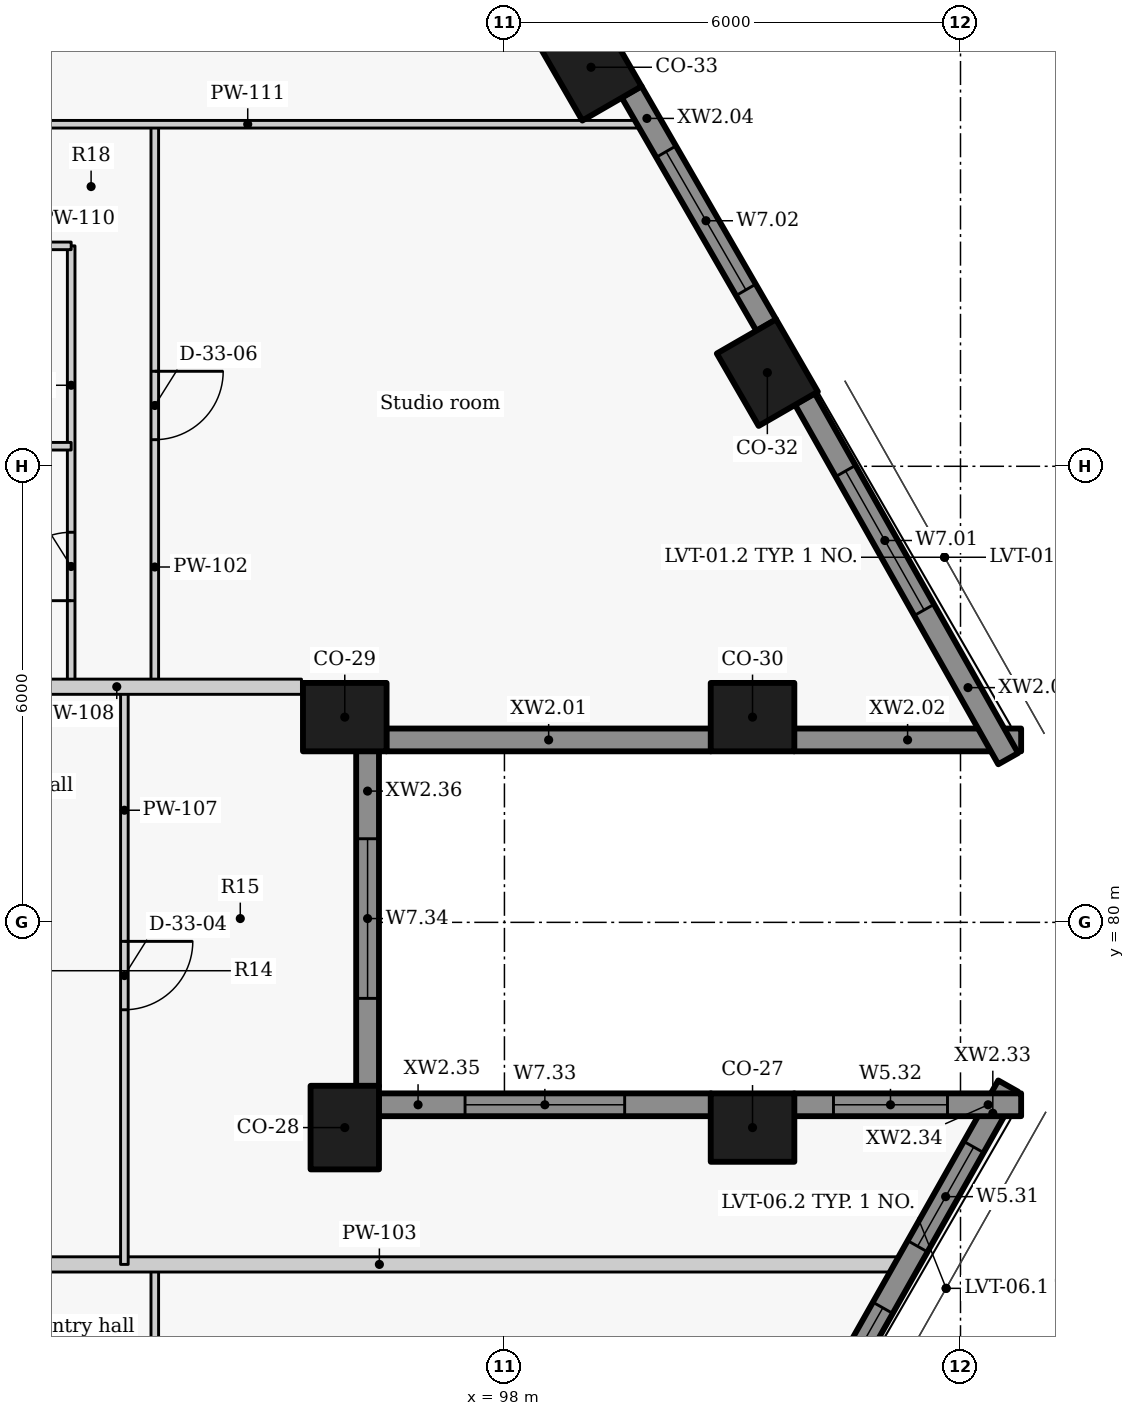
"""IFC4 building model, lengths in metres.
Left out: names, types, materials, properties, quantities, classifications, styles, units other than length and angle.
Written with IfcOpenShell. Run it as: python <this file> out.ifc"""

import sys

from ifc_helpers import new_model, si_unit, direction, frame, frame_2d, origin, origin_2d, place, context, subcontext, project, spatial, rectangle, extrude, element, fill, save


model = new_model("IFC4")
c1 = context("Model", 3, precision=1e-05, world=origin(), true_north=direction((0.0, 1.0)))
c2 = subcontext(c1, "Body", "Model", "MODEL_VIEW")
j1 = project(units=[si_unit("LENGTHUNIT", "METRE"), si_unit("PLANEANGLEUNIT", "RADIAN")], contexts=[c1])
p1 = place(None, origin())
s1 = spatial("IfcSite", under=j1, at=p1, CompositionType="ELEMENT")
p2 = place(p1, origin())
s2 = spatial("IfcBuilding", under=s1, at=p2, CompositionType="ELEMENT")
p3 = place(p2, frame((0.0, 0.0, 259.2)))
s3 = spatial("IfcBuildingStorey", under=s2, at=p3, CompositionType="ELEMENT", Elevation=259.2)
for number, where, z_axis, x_axis in (
    (1, (101.264, 77.3, 0.0), (0.0, 0.0, 1.0), (-1.0, 0.0, 0.0)),
    (2, (95.899, 77.3, 0.0), (0.0, 0.0, 1.0), (0.0, 1.0, 0.0)),
    (3, (95.899, 82.7, 0.0), (0.0, 0.0, 1.0), (1.0, 0.0, 0.0)),
    (4, (101.264, 82.7, 0.0), (0.0, 0.0, 1.0), (1.0, 0.0, 0.0)),
    (5, (101.459, 87.232, 0.0), (0.0, 0.0, 1.0), (-0.5, 0.866, 0.0)),
    (6, (99.139, 91.25, 0.0), (0.0, 0.0, 1.0), (-0.5, 0.866, 0.0)),
):
    element("IfcColumn", number, at=place(p3, frame(where, z_axis=z_axis, x_axis=x_axis)), inside=s3, PredefinedType="COLUMN", context=c2, shape_type="SweptSolid", body=[
        extrude(rectangle(XDim=1.1, YDim=0.9, at=origin_2d()), origin(), (0.0, 0.0, 1.0), 3.3),
    ])
p4 = place(p3, frame((96.446, 82.4, 0.0), z_axis=(0.0, 0.0, 1.0), x_axis=(1.0, 0.0, 0.0)))
e7 = element("IfcWall", 7, at=p4, inside=s3, PredefinedType="SOLIDWALL", context=c2, shape_type="SweptSolid", body=[
    extrude(rectangle(XDim=4.272, YDim=0.3, at=frame_2d((2.136, 0.0))), origin(), (0.0, 0.0, 1.0), 2.425),
])
p5 = place(p3, frame((101.81, 82.4, 0.0), z_axis=(0.0, 0.0, 1.0), x_axis=(1.0, 0.0, 0.0)))
e8 = element("IfcWall", 8, at=p5, inside=s3, PredefinedType="SOLIDWALL", context=c2, shape_type="SweptSolid", body=[
    extrude(rectangle(XDim=2.988, YDim=0.3, at=frame_2d((1.494, 0.0))), origin(), (0.0, 0.0, 1.0), 2.425),
])
p6 = place(p3, frame((104.627, 82.154, 0.0), z_axis=(0.0, 0.0, 1.0), x_axis=(-0.492080931903, 0.870549456641, 0.0)))
e9 = element("IfcWall", 9, at=p6, inside=s3, PredefinedType="SOLIDWALL", context=c2, shape_type="SweptSolid", body=[
    extrude(rectangle(XDim=5.437, YDim=0.3, at=frame_2d((2.718, 0.0))), origin(), (0.0, 0.0, 1.0), 2.425),
])
p7 = place(p6, frame((2.247, 0.0, 0.9)))
e10 = element("IfcOpeningElement", 10, at=p7, cuts=e9, PredefinedType="OPENING", context=c2, shape_type="SweptSolid", body=[
    extrude(rectangle(XDim=2.1, YDim=1.1, at=frame_2d((1.05, 0.55))), frame((0.0, 0.16, 0.0), z_axis=(0.0, -1.0, 0.0), x_axis=(1.0, 0.0, 0.0)), (0.0, 0.0, 1.0), 0.32),
])
p8 = place(p3, frame((101.446, 87.855, 0.0), z_axis=(0.0, 0.0, 1.0), x_axis=(-0.500010404316, 0.866019396766, 0.0)))
e11 = element("IfcWall", 11, at=p8, inside=s3, PredefinedType="SOLIDWALL", context=c2, shape_type="SweptSolid", body=[
    extrude(rectangle(XDim=3.547, YDim=0.3, at=frame_2d((1.774, 0.0))), origin(), (0.0, 0.0, 1.0), 2.425),
])
p9 = place(p8, frame((0.538, 0.0, 0.9)))
e12 = element("IfcOpeningElement", 12, at=p9, cuts=e11, PredefinedType="OPENING", context=c2, shape_type="SweptSolid", body=[
    extrude(rectangle(XDim=2.1, YDim=1.1, at=frame_2d((1.05, 0.55))), frame((0.0, 0.16, 0.0), z_axis=(0.0, -1.0, 0.0), x_axis=(1.0, 0.0, 0.0)), (0.0, 0.0, 1.0), 0.32),
])
p10 = place(p3, frame((101.952, 73.114, 0.0), z_axis=(0.0, 0.0, 1.0), x_axis=(0.492080931903, 0.870549456641, 0.0)))
e13 = element("IfcWall", 13, at=p10, inside=s3, PredefinedType="SOLIDWALL", context=c2, shape_type="SweptSolid", body=[
    extrude(rectangle(XDim=5.437, YDim=0.3, at=frame_2d((2.718, 0.0))), origin(), (0.0, 0.0, 1.0), 2.425),
])
p11 = place(p10, frame((0.585, 0.0, 0.9)))
e14 = element("IfcOpeningElement", 14, at=p11, cuts=e13, PredefinedType="OPENING", context=c2, shape_type="SweptSolid", body=[
    extrude(rectangle(XDim=1.5, YDim=1.1, at=frame_2d((0.75, 0.55))), frame((0.0, 0.16, 0.0), z_axis=(0.0, -1.0, 0.0), x_axis=(1.0, 0.0, 0.0)), (0.0, 0.0, 1.0), 0.32),
])
p12 = place(p10, frame((3.015, 0.0, 0.9)))
e15 = element("IfcOpeningElement", 15, at=p12, cuts=e13, PredefinedType="OPENING", context=c2, shape_type="SweptSolid", body=[
    extrude(rectangle(XDim=1.5, YDim=1.1, at=frame_2d((0.75, 0.55))), frame((0.0, 0.16, 0.0), z_axis=(0.0, -1.0, 0.0), x_axis=(1.0, 0.0, 0.0)), (0.0, 0.0, 1.0), 0.32),
])
p13 = place(p3, frame((104.798, 77.6, 0.0), z_axis=(0.0, 0.0, 1.0), x_axis=(-1.0, 0.0, 0.0)))
e16 = element("IfcWall", 16, at=p13, inside=s3, PredefinedType="SOLIDWALL", context=c2, shape_type="SweptSolid", body=[
    extrude(rectangle(XDim=2.988, YDim=0.3, at=frame_2d((1.494, 0.0))), origin(), (0.0, 0.0, 1.0), 2.425),
])
p14 = place(p13, frame((0.969, 0.0, 0.9)))
e17 = element("IfcOpeningElement", 17, at=p14, cuts=e16, PredefinedType="OPENING", context=c2, shape_type="SweptSolid", body=[
    extrude(rectangle(XDim=1.5, YDim=1.1, at=frame_2d((0.75, 0.55))), frame((0.0, 0.16, 0.0), z_axis=(0.0, -1.0, 0.0), x_axis=(1.0, 0.0, 0.0)), (0.0, 0.0, 1.0), 0.32),
])
p15 = place(p3, frame((100.718, 77.6, 0.0), z_axis=(0.0, 0.0, 1.0), x_axis=(-1.0, 0.0, 0.0)))
e18 = element("IfcWall", 18, at=p15, inside=s3, PredefinedType="SOLIDWALL", context=c2, shape_type="SweptSolid", body=[
    extrude(rectangle(XDim=4.373, YDim=0.3, at=frame_2d((2.186, 0.0))), origin(), (0.0, 0.0, 1.0), 2.425),
])
p16 = place(p15, frame((1.136, 0.0, 0.9)))
e19 = element("IfcOpeningElement", 19, at=p16, cuts=e18, PredefinedType="OPENING", context=c2, shape_type="SweptSolid", body=[
    extrude(rectangle(XDim=2.1, YDim=1.1, at=frame_2d((1.05, 0.55))), frame((0.0, 0.16, 0.0), z_axis=(0.0, -1.0, 0.0), x_axis=(1.0, 0.0, 0.0)), (0.0, 0.0, 1.0), 0.32),
])
p17 = place(p3, frame((96.199, 77.846, 0.0), z_axis=(0.0, 0.0, 1.0), x_axis=(0.0, 1.0, 0.0)))
e20 = element("IfcWall", 20, at=p17, inside=s3, PredefinedType="SOLIDWALL", context=c2, shape_type="SweptSolid", body=[
    extrude(rectangle(XDim=4.408, YDim=0.3, at=frame_2d((2.204, 0.0))), origin(), (0.0, 0.0, 1.0), 2.425),
])
p18 = place(p17, frame((1.154, 0.0, 0.9)))
e21 = element("IfcOpeningElement", 21, at=p18, cuts=e20, PredefinedType="OPENING", context=c2, shape_type="SweptSolid", body=[
    extrude(rectangle(XDim=2.1, YDim=1.1, at=frame_2d((1.05, 0.55))), frame((0.0, 0.16, 0.0), z_axis=(0.0, -1.0, 0.0), x_axis=(1.0, 0.0, 0.0)), (0.0, 0.0, 1.0), 0.32),
])
p19 = place(p3, frame((92.3, 83.1, 0.0), z_axis=(0.0, 0.0, 1.0), x_axis=(0.0, 1.0, 0.0)))
e22 = element("IfcWall", 22, at=p19, inside=s3, PredefinedType="PARTITIONING", context=c2, shape_type="SweptSolid", body=[
    extrude(rectangle(XDim=5.8, YDim=0.1, at=frame_2d((2.9, 0.0))), origin(), (0.0, 0.0, 1.0), 3.025),
])
p20 = place(p19, frame((1.132, 0.0, 0.0)))
e23 = element("IfcOpeningElement", 23, at=p20, cuts=e22, PredefinedType="OPENING", context=c2, shape_type="SweptSolid", body=[
    extrude(rectangle(XDim=0.9, YDim=2.1, at=frame_2d((0.45, 1.05))), frame((0.0, 0.06, 0.0), z_axis=(0.0, -1.0, 0.0), x_axis=(1.0, 0.0, 0.0)), (0.0, 0.0, 1.0), 0.12),
])
p21 = place(p3, frame((93.4, 75.5, 0.0), z_axis=(0.0, 0.0, 1.0), x_axis=(0.0, -1.0, 0.0)))
e24 = element("IfcWall", 24, at=p21, inside=s3, PredefinedType="PARTITIONING", context=c2, shape_type="SweptSolid", body=[
    extrude(rectangle(XDim=9.05, YDim=0.1, at=frame_2d((4.525, 0.0))), origin(), (0.0, 0.0, 1.0), 3.025),
])
p22 = place(p21, frame((4.075, 0.0, 0.0)))
e25 = element("IfcOpeningElement", 25, at=p22, cuts=e24, PredefinedType="OPENING", context=c2, shape_type="SweptSolid", body=[
    extrude(rectangle(XDim=0.9, YDim=2.1, at=frame_2d((0.45, 1.05))), frame((0.0, 0.06, 0.0), z_axis=(0.0, -1.0, 0.0), x_axis=(1.0, 0.0, 0.0)), (0.0, 0.0, 1.0), 0.12),
])
p23 = place(p3, frame((93.4, 90.5, 0.0), z_axis=(0.0, 0.0, 1.0), x_axis=(0.0, -1.0, 0.0)))
e26 = element("IfcWall", 26, at=p23, inside=s3, PredefinedType="PARTITIONING", context=c2, shape_type="SweptSolid", body=[
    extrude(rectangle(XDim=7.4, YDim=0.1, at=frame_2d((3.7, 0.0))), origin(), (0.0, 0.0, 1.0), 3.025),
])
p24 = place(p23, frame((3.25, 0.0, 0.0)))
e27 = element("IfcOpeningElement", 27, at=p24, cuts=e26, PredefinedType="OPENING", context=c2, shape_type="SweptSolid", body=[
    extrude(rectangle(XDim=0.9, YDim=2.1, at=frame_2d((0.45, 1.05))), frame((0.0, 0.06, 0.0), z_axis=(0.0, -1.0, 0.0), x_axis=(1.0, 0.0, 0.0)), (0.0, 0.0, 1.0), 0.12),
])
p25 = place(p3, frame((89.5, 75.5, 0.0), z_axis=(0.0, 0.0, 1.0), x_axis=(1.0, 0.0, 0.0)))
e28 = element("IfcWall", 28, at=p25, inside=s3, PredefinedType="PARTITIONING", context=c2, shape_type="SweptSolid", body=[
    extrude(rectangle(XDim=13.709, YDim=0.2, at=frame_2d((6.855, 0.0))), origin(), (0.0, 0.0, 1.0), 2.405),
])
p26 = place(p3, frame((93.0, 83.1, 0.0), z_axis=(0.0, 0.0, 1.0), x_axis=(0.0, -1.0, 0.0)))
e29 = element("IfcWall", 29, at=p26, inside=s3, PredefinedType="PARTITIONING", context=c2, shape_type="SweptSolid", body=[
    extrude(rectangle(XDim=7.6, YDim=0.1, at=frame_2d((3.8, 0.0))), origin(), (0.0, 0.0, 1.0), 3.025),
])
p27 = place(p26, frame((3.35, 0.0, 0.0)))
e30 = element("IfcOpeningElement", 30, at=p27, cuts=e29, PredefinedType="OPENING", context=c2, shape_type="SweptSolid", body=[
    extrude(rectangle(XDim=0.9, YDim=2.1, at=frame_2d((0.45, 1.05))), frame((0.0, 0.06, 0.0), z_axis=(0.0, -1.0, 0.0), x_axis=(1.0, 0.0, 0.0)), (0.0, 0.0, 1.0), 0.12),
])
p28 = place(p3, frame((90.47, 83.1, 0.0), z_axis=(0.0, 0.0, 1.0), x_axis=(1.0, 0.0, 0.0)))
e31 = element("IfcWall", 31, at=p28, inside=s3, PredefinedType="PARTITIONING", context=c2, shape_type="SweptSolid", body=[
    extrude(rectangle(XDim=4.86, YDim=0.2, at=frame_2d((2.43, 0.0))), origin(), (0.0, 0.0, 1.0), 3.025),
])
p29 = place(p3, frame((89.5, 86.264, 0.0), z_axis=(0.0, 0.0, 1.0), x_axis=(1.0, 0.0, 0.0)))
e32 = element("IfcWall", 32, at=p29, inside=s3, PredefinedType="PARTITIONING", context=c2, shape_type="SweptSolid", body=[
    extrude(rectangle(XDim=2.8, YDim=0.1, at=frame_2d((1.4, 0.0))), origin(), (0.0, 0.0, 1.0), 2.505),
])
p30 = place(p3, frame((92.3, 88.9, 0.0), z_axis=(0.0, 0.0, 1.0), x_axis=(-1.0, 0.0, 0.0)))
e33 = element("IfcWall", 33, at=p30, inside=s3, PredefinedType="PARTITIONING", context=c2, shape_type="SweptSolid", body=[
    extrude(rectangle(XDim=2.8, YDim=0.1, at=frame_2d((1.4, 0.0))), origin(), (0.0, 0.0, 1.0), 2.505),
])
p31 = place(p30, frame((0.975, 0.0, 0.0)))
e34 = element("IfcOpeningElement", 34, at=p31, cuts=e33, PredefinedType="OPENING", context=c2, shape_type="SweptSolid", body=[
    extrude(rectangle(XDim=0.85, YDim=2.1, at=frame_2d((0.425, 1.05))), frame((0.0, 0.06, 0.0), z_axis=(0.0, -1.0, 0.0), x_axis=(1.0, 0.0, 0.0)), (0.0, 0.0, 1.0), 0.12),
])
p32 = place(p3, frame((89.5, 90.5, 0.0), z_axis=(0.0, 0.0, 1.0), x_axis=(1.0, 0.0, 0.0)))
e35 = element("IfcWall", 35, at=p32, inside=s3, PredefinedType="PARTITIONING", context=c2, shape_type="SweptSolid", body=[
    extrude(rectangle(XDim=10.245, YDim=0.1, at=frame_2d((5.123, 0.0))), origin(), (0.0, 0.0, 1.0), 2.405),
])
p33 = place(p7, origin())
e36 = element("IfcWindow", 36, at=p33, inside=s3, PartitioningType="SINGLE_PANEL", PredefinedType="WINDOW", context=c2, shape_type="SweptSolid", body=[
    extrude(rectangle(XDim=2.1, YDim=1.1, at=frame_2d((1.05, 0.55))), frame((0.0, 0.03, 0.0), z_axis=(0.0, -1.0, 0.0), x_axis=(1.0, 0.0, 0.0)), (0.0, 0.0, 1.0), 0.06),
])
fill(e10, e36)
p34 = place(p9, origin())
e37 = element("IfcWindow", 37, at=p34, inside=s3, PartitioningType="SINGLE_PANEL", PredefinedType="WINDOW", context=c2, shape_type="SweptSolid", body=[
    extrude(rectangle(XDim=2.1, YDim=1.1, at=frame_2d((1.05, 0.55))), frame((0.0, 0.03, 0.0), z_axis=(0.0, -1.0, 0.0), x_axis=(1.0, 0.0, 0.0)), (0.0, 0.0, 1.0), 0.06),
])
fill(e12, e37)
p35 = place(p11, origin())
e38 = element("IfcWindow", 38, at=p35, inside=s3, PartitioningType="SINGLE_PANEL", PredefinedType="WINDOW", context=c2, shape_type="SweptSolid", body=[
    extrude(rectangle(XDim=1.5, YDim=1.1, at=frame_2d((0.75, 0.55))), frame((0.0, 0.03, 0.0), z_axis=(0.0, -1.0, 0.0), x_axis=(1.0, 0.0, 0.0)), (0.0, 0.0, 1.0), 0.06),
])
fill(e14, e38)
p36 = place(p12, origin())
e39 = element("IfcWindow", 39, at=p36, inside=s3, PartitioningType="SINGLE_PANEL", PredefinedType="WINDOW", context=c2, shape_type="SweptSolid", body=[
    extrude(rectangle(XDim=1.5, YDim=1.1, at=frame_2d((0.75, 0.55))), frame((0.0, 0.03, 0.0), z_axis=(0.0, -1.0, 0.0), x_axis=(1.0, 0.0, 0.0)), (0.0, 0.0, 1.0), 0.06),
])
fill(e15, e39)
p37 = place(p14, origin())
e40 = element("IfcWindow", 40, at=p37, inside=s3, PartitioningType="SINGLE_PANEL", PredefinedType="WINDOW", context=c2, shape_type="SweptSolid", body=[
    extrude(rectangle(XDim=1.5, YDim=1.1, at=frame_2d((0.75, 0.55))), frame((0.0, 0.03, 0.0), z_axis=(0.0, -1.0, 0.0), x_axis=(1.0, 0.0, 0.0)), (0.0, 0.0, 1.0), 0.06),
])
fill(e17, e40)
p38 = place(p16, origin())
e41 = element("IfcWindow", 41, at=p38, inside=s3, PartitioningType="SINGLE_PANEL", PredefinedType="WINDOW", context=c2, shape_type="SweptSolid", body=[
    extrude(rectangle(XDim=2.1, YDim=1.1, at=frame_2d((1.05, 0.55))), frame((0.0, 0.03, 0.0), z_axis=(0.0, -1.0, 0.0), x_axis=(1.0, 0.0, 0.0)), (0.0, 0.0, 1.0), 0.06),
])
fill(e19, e41)
p39 = place(p18, origin())
e42 = element("IfcWindow", 42, at=p39, inside=s3, PartitioningType="SINGLE_PANEL", PredefinedType="WINDOW", context=c2, shape_type="SweptSolid", body=[
    extrude(rectangle(XDim=2.1, YDim=1.1, at=frame_2d((1.05, 0.55))), frame((0.0, 0.03, 0.0), z_axis=(0.0, -1.0, 0.0), x_axis=(1.0, 0.0, 0.0)), (0.0, 0.0, 1.0), 0.06),
])
fill(e21, e42)
p40 = place(p27, origin())
e43 = element("IfcDoor", 43, at=p40, inside=s3, OperationType="SINGLE_SWING_LEFT", PredefinedType="DOOR", context=c2, shape_type="SweptSolid", body=[
    extrude(rectangle(XDim=0.9, YDim=2.1, at=frame_2d((0.45, 1.05))), frame((0.0, 0.025, 0.0), z_axis=(0.0, -1.0, 0.0), x_axis=(1.0, 0.0, 0.0)), (0.0, 0.0, 1.0), 0.05),
])
fill(e30, e43)
p41 = place(p20, origin())
e44 = element("IfcDoor", 44, at=p41, inside=s3, OperationType="SINGLE_SWING_LEFT", PredefinedType="DOOR", context=c2, shape_type="SweptSolid", body=[
    extrude(rectangle(XDim=0.9, YDim=2.1, at=frame_2d((0.45, 1.05))), frame((0.0, 0.025, 0.0), z_axis=(0.0, -1.0, 0.0), x_axis=(1.0, 0.0, 0.0)), (0.0, 0.0, 1.0), 0.05),
])
fill(e23, e44)
p42 = place(p24, origin())
e45 = element("IfcDoor", 45, at=p42, inside=s3, OperationType="SINGLE_SWING_LEFT", PredefinedType="DOOR", context=c2, shape_type="SweptSolid", body=[
    extrude(rectangle(XDim=0.9, YDim=2.1, at=frame_2d((0.45, 1.05))), frame((0.0, 0.025, 0.0), z_axis=(0.0, -1.0, 0.0), x_axis=(1.0, 0.0, 0.0)), (0.0, 0.0, 1.0), 0.05),
])
fill(e27, e45)
save(model, sys.argv[1])
